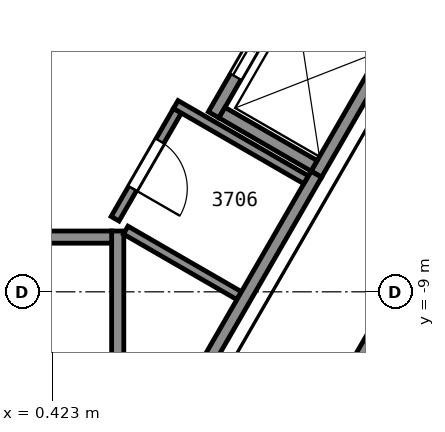
"""IFC4 building model, lengths in metres.
Left out: names, types, materials, properties, quantities, classifications, styles, units other than length and angle.
Written with IfcOpenShell. Run it as: python <this file> out.ifc"""

import sys

from ifc_helpers import new_model, si_unit, direction, frame, frame_2d, origin, place, context, subcontext, project, spatial, rectangle, extrude, element, fill, save


model = new_model("IFC4")
c1 = context("Model", 3, precision=1e-05, world=origin(), true_north=direction((0.0, 1.0)))
c2 = subcontext(c1, "Body", "Model", "MODEL_VIEW")
j1 = project(units=[si_unit("LENGTHUNIT", "METRE"), si_unit("PLANEANGLEUNIT", "RADIAN")], contexts=[c1])
p1 = place(None, origin())
s1 = spatial("IfcSite", under=j1, at=p1, CompositionType="ELEMENT")
p2 = place(p1, origin())
s2 = spatial("IfcBuilding", under=s1, at=p2, CompositionType="ELEMENT")
p3 = place(p2, frame((0.0, 0.0, 152.5)))
s3 = spatial("IfcBuildingStorey", under=s2, at=p3, CompositionType="ELEMENT", Elevation=152.5)
p4 = place(p3, frame((1.5, -8.0, 0.0), z_axis=(0.0, 0.0, 1.0), x_axis=(0.0, -1.0, 0.0)))
e1 = element("IfcWall", 1, at=p4, inside=s3, PredefinedType="PARTITIONING", context=c2, shape_type="SweptSolid", body=[
    extrude(rectangle(XDim=9.6, YDim=0.2, at=frame_2d((4.8, 0.0))), origin(), (0.0, 0.0, 1.0), 3.45),
])
p5 = place(p3, frame((-1.4, -8.1, 0.0), z_axis=(0.0, 0.0, 1.0), x_axis=(1.0, 0.0, 0.0)))
e2 = element("IfcWall", 2, at=p5, inside=s3, PredefinedType="PARTITIONING", context=c2, shape_type="SweptSolid", body=[
    extrude(rectangle(XDim=2.8, YDim=0.2, at=frame_2d((1.4, 0.0))), origin(), (0.0, 0.0, 1.0), 3.45),
])
p6 = place(p3, frame((4.766, -7.065, 0.0), z_axis=(0.0, 0.0, 1.0), x_axis=(0.499948979701, 0.866054858364, 0.0)))
e3 = element("IfcWall", 3, at=p6, inside=s3, PredefinedType="PARTITIONING", context=c2, shape_type="SweptSolid", body=[
    extrude(rectangle(XDim=2.55, YDim=0.2, at=frame_2d((1.275, 0.0))), origin(), (0.0, 0.0, 1.0), 3.7),
])
p7 = place(p3, frame((3.077, -6.09, 0.0), z_axis=(0.0, 0.0, 1.0), x_axis=(0.500062241894, 0.865989465428, 0.0)))
e4 = element("IfcWall", 4, at=p7, inside=s3, PredefinedType="PARTITIONING", context=c2, shape_type="SweptSolid", body=[
    extrude(rectangle(XDim=2.55, YDim=0.2, at=frame_2d((1.275, 0.0))), origin(), (0.0, 0.0, 1.0), 3.7),
])
p8 = place(p7, frame((0.725, 0.0, 0.0)))
e5 = element("IfcOpeningElement", 5, at=p8, cuts=e4, PredefinedType="OPENING", context=c2, shape_type="SweptSolid", body=[
    extrude(rectangle(XDim=1.1, YDim=2.1, at=frame_2d((0.55, 1.05))), frame((0.0, 0.11, 0.0), z_axis=(0.0, -1.0, 0.0), x_axis=(1.0, 0.0, 0.0)), (0.0, 0.0, 1.0), 0.22),
])
p9 = place(p3, frame((4.73, -6.928, 0.0), z_axis=(0.0, 0.0, 1.0), x_axis=(-0.866036909293, 0.499980071345, 0.0)))
e6 = element("IfcWall", 6, at=p9, inside=s3, PredefinedType="PARTITIONING", context=c2, shape_type="SweptSolid", body=[
    extrude(rectangle(XDim=1.75, YDim=0.2, at=frame_2d((0.875, 0.0))), origin(), (0.0, 0.0, 1.0), 3.7),
])
p10 = place(p3, frame((2.481, -6.022, 0.0), z_axis=(0.0, 0.0, 1.0), x_axis=(-0.499801470403, -0.866139994564, 0.0)))
e7 = element("IfcWall", 7, at=p10, inside=s3, PredefinedType="PARTITIONING", context=c2, shape_type="SweptSolid", body=[
    extrude(rectangle(XDim=2.051, YDim=0.15, at=frame_2d((1.025, 0.0))), origin(), (0.0, 0.0, 1.0), 3.45),
])
p11 = place(p10, frame((0.576, 0.0, 0.0)))
e8 = element("IfcOpeningElement", 8, at=p11, cuts=e7, PredefinedType="OPENING", context=c2, shape_type="SweptSolid", body=[
    extrude(rectangle(XDim=0.9, YDim=2.1, at=frame_2d((0.45, 1.05))), frame((0.0, 0.085, 0.0), z_axis=(0.0, -1.0, 0.0), x_axis=(1.0, 0.0, 0.0)), (0.0, 0.0, 1.0), 0.17),
])
p12 = place(p3, frame((1.631, -7.986, 0.0), z_axis=(0.0, 0.0, 1.0), x_axis=(0.866038426532, -0.499977443261, 0.0)))
e9 = element("IfcWall", 9, at=p12, inside=s3, PredefinedType="PARTITIONING", context=c2, shape_type="SweptSolid", body=[
    extrude(rectangle(XDim=2.155, YDim=0.15, at=frame_2d((1.077, 0.0))), origin(), (0.0, 0.0, 1.0), 3.45),
])
p13 = place(p3, frame((1.677, -12.415, 0.0), z_axis=(0.0, 0.0, 1.0), x_axis=(0.500054337157, 0.865994029939, 0.0)))
e10 = element("IfcWall", 10, at=p13, inside=s3, PredefinedType="PARTITIONING", context=c2, shape_type="SweptSolid", body=[
    extrude(rectangle(XDim=6.177, YDim=0.2, at=frame_2d((3.088, 0.0))), origin(), (0.0, 0.0, 1.0), 3.45),
])
p14 = place(p3, frame((2.454, -5.919, 0.0), z_axis=(0.0, 0.0, 1.0), x_axis=(0.866006523861, -0.500032699561, 0.0)))
e11 = element("IfcWall", 11, at=p14, inside=s3, PredefinedType="PARTITIONING", context=c2, shape_type="SweptSolid", body=[
    extrude(rectangle(XDim=2.475, YDim=0.15, at=frame_2d((1.237, 0.0))), origin(), (0.0, 0.0, 1.0), 3.45),
])
p15 = place(p3, frame((12.928, 2.789, 0.0), z_axis=(0.0, 0.0, 1.0), x_axis=(-0.499997769292, -0.86602669168, 0.0)))
e12 = element("IfcWall", 12, at=p15, inside=s3, PredefinedType="PARTITIONING", context=c2, shape_type="SweptSolid", body=[
    extrude(rectangle(XDim=17.706, YDim=0.2, at=frame_2d((8.853, 0.0))), origin(), (0.0, 0.0, 1.0), 2.713),
])
p16 = place(p15, frame((15.156, 0.0, 0.0)))
e13 = element("IfcOpeningElement", 13, at=p16, cuts=e12, PredefinedType="OPENING", context=c2, shape_type="SweptSolid", body=[
    extrude(rectangle(XDim=1.2, YDim=2.1, at=frame_2d((0.6, 1.05))), frame((0.0, 0.11, 0.0), z_axis=(0.0, -1.0, 0.0), x_axis=(1.0, 0.0, 0.0)), (0.0, 0.0, 1.0), 0.22),
])
p17 = place(p15, frame((11.042, 0.0, 0.0)))
e14 = element("IfcOpeningElement", 14, at=p17, cuts=e12, PredefinedType="OPENING", context=c2, shape_type="SweptSolid", body=[
    extrude(rectangle(XDim=0.9, YDim=2.1, at=frame_2d((0.45, 1.05))), frame((0.0, 0.11, 0.0), z_axis=(0.0, -1.0, 0.0), x_axis=(1.0, 0.0, 0.0)), (0.0, 0.0, 1.0), 0.22),
])
p18 = place(p15, frame((7.14, 0.0, 0.0)))
e15 = element("IfcOpeningElement", 15, at=p18, cuts=e12, PredefinedType="OPENING", context=c2, shape_type="SweptSolid", body=[
    extrude(rectangle(XDim=0.9, YDim=2.1, at=frame_2d((0.45, 1.05))), frame((0.0, 0.11, 0.0), z_axis=(0.0, -1.0, 0.0), x_axis=(1.0, 0.0, 0.0)), (0.0, 0.0, 1.0), 0.22),
])
p19 = place(p15, frame((0.515, 0.0, 0.0)))
e16 = element("IfcOpeningElement", 16, at=p19, cuts=e12, PredefinedType="OPENING", context=c2, shape_type="SweptSolid", body=[
    extrude(rectangle(XDim=0.9, YDim=2.1, at=frame_2d((0.45, 1.05))), frame((0.0, 0.11, 0.0), z_axis=(0.0, -1.0, 0.0), x_axis=(1.0, 0.0, 0.0)), (0.0, 0.0, 1.0), 0.22),
])
p20 = place(p8, origin())
e17 = element("IfcDoor", 17, at=p20, inside=s3, OperationType="SLIDING_TO_LEFT", PredefinedType="DOOR", context=c2, shape_type="SweptSolid", body=[
    extrude(rectangle(XDim=1.1, YDim=2.1, at=frame_2d((0.55, 1.05))), frame((0.0, 0.025, 0.0), z_axis=(0.0, -1.0, 0.0), x_axis=(1.0, 0.0, 0.0)), (0.0, 0.0, 1.0), 0.05),
])
fill(e5, e17)
p21 = place(p11, origin())
e18 = element("IfcDoor", 18, at=p21, inside=s3, OperationType="SINGLE_SWING_RIGHT", PredefinedType="DOOR", context=c2, shape_type="SweptSolid", body=[
    extrude(rectangle(XDim=0.9, YDim=2.1, at=frame_2d((0.45, 1.05))), frame((0.0, 0.025, 0.0), z_axis=(0.0, -1.0, 0.0), x_axis=(1.0, 0.0, 0.0)), (0.0, 0.0, 1.0), 0.05),
])
fill(e8, e18)
save(model, sys.argv[1])
